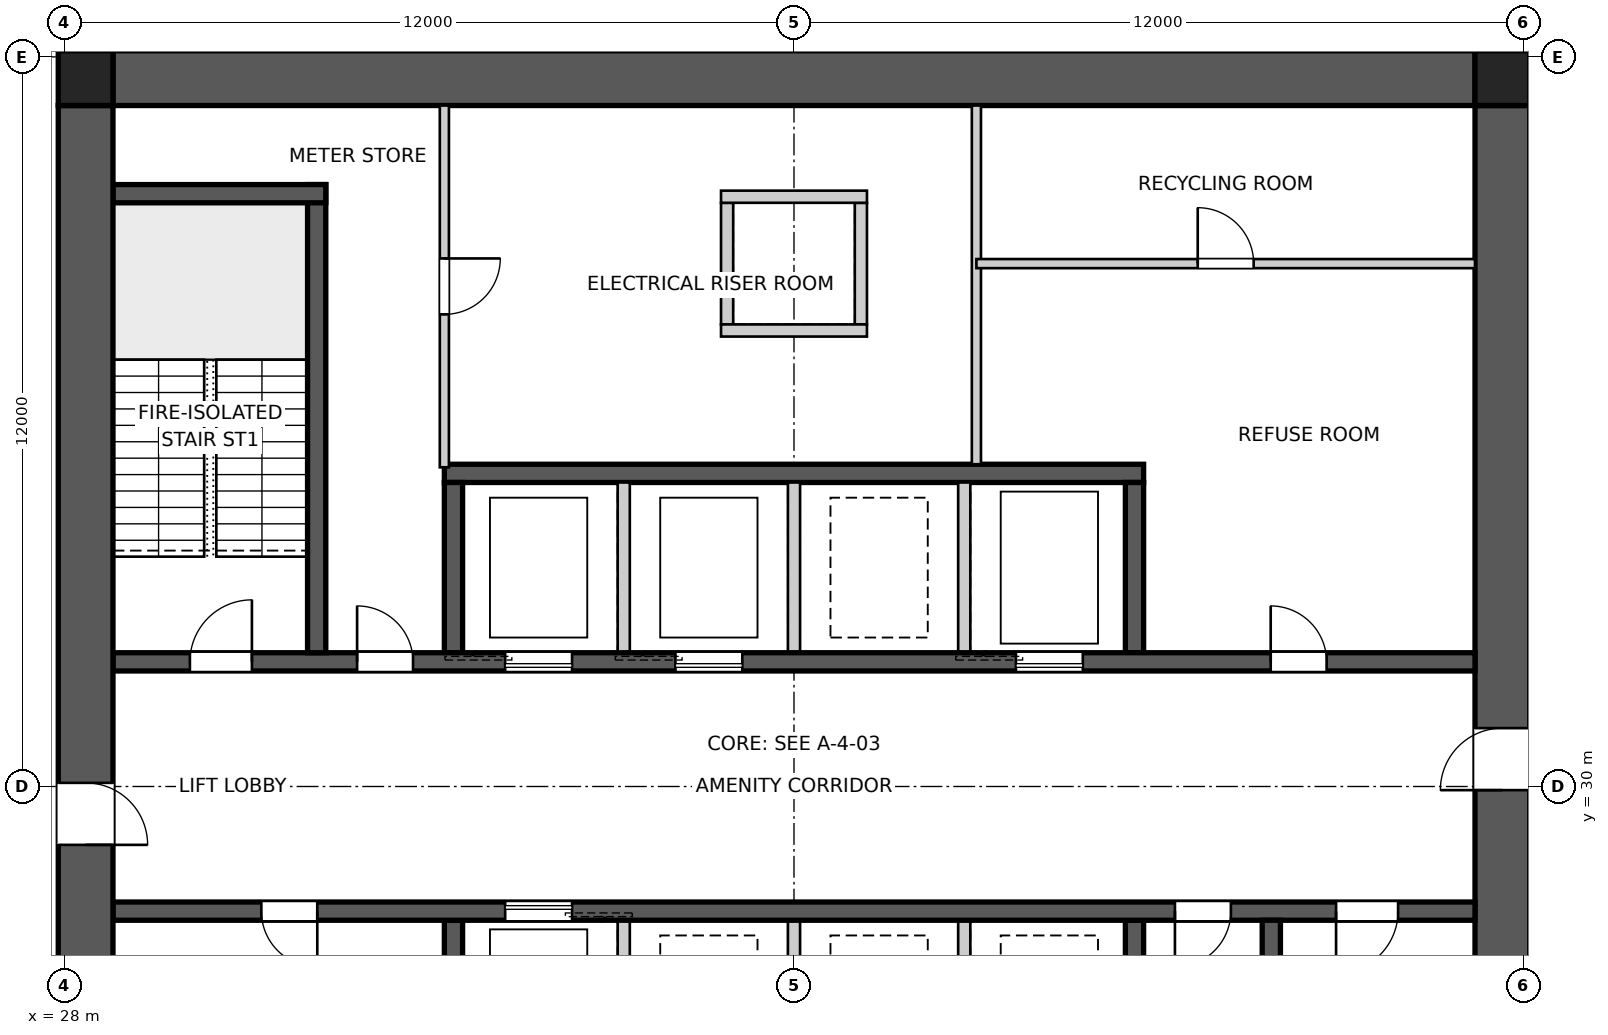
"""IFC4 building model, lengths in metres.
Left out: names, types, materials, properties, quantities, classifications, styles, units other than length and angle.
Written with IfcOpenShell. Run it as: python <this file> out.ifc"""

import sys

from ifc_helpers import new_model, si_unit, direction, frame, frame_2d, origin, origin_2d, place, context, subcontext, project, spatial, polyline, rectangle, outline, extrude, element, fill, save


model = new_model("IFC4")
c1 = context("Model", 3, precision=1e-05, world=origin(), true_north=direction((0.0, 1.0)))
c2 = subcontext(c1, "Body", "Model", "MODEL_VIEW")
j1 = project(units=[si_unit("LENGTHUNIT", "METRE"), si_unit("PLANEANGLEUNIT", "RADIAN")], contexts=[c1])
p1 = place(None, origin())
s1 = spatial("IfcSite", under=j1, at=p1, CompositionType="ELEMENT")
p2 = place(p1, origin())
s2 = spatial("IfcBuilding", under=s1, at=p2, CompositionType="ELEMENT")
p3 = place(p2, frame((0.0, 0.0, 6.0)))
s3 = spatial("IfcBuildingStorey", under=s2, at=p3, CompositionType="ELEMENT", Elevation=6.0)
p4 = place(p3, frame((28.8, 41.65, 0.0), z_axis=(0.0, 0.0, 1.0), x_axis=(1.0, 0.0, 0.0)))
e1 = element("IfcWall", 1, at=p4, inside=s3, PredefinedType="SHEAR", context=c2, shape_type="SweptSolid", body=[
    extrude(outline(polyline([(0.0, -0.45), (22.4, -0.45), (22.4, -0.025), (22.85, -0.025), (22.85, 0.025), (22.4, 0.025), (22.4, 0.45), (0.0, 0.45), (0.0, 0.025), (-0.45, 0.025), (-0.45, -0.025), (0.0, -0.025), (0.0, -0.45)])), origin(), (0.0, 0.0, 1.0), 4.5),
])
p5 = place(p3, frame((51.65, 18.8, 0.0), z_axis=(0.0, 0.0, 1.0), x_axis=(0.0, 1.0, 0.0)))
e2 = element("IfcWall", 2, at=p5, inside=s3, PredefinedType="SHEAR", context=c2, shape_type="SweptSolid", body=[
    extrude(outline(polyline([(0.0, -0.45), (22.4, -0.45), (22.4, -0.025), (22.85, -0.025), (22.85, 0.025), (22.4, 0.025), (22.4, 0.45), (0.0, 0.45), (0.0, 0.025), (-0.45, 0.025), (-0.45, -0.025), (0.0, -0.025), (0.0, -0.45)])), origin(), (0.0, 0.0, 1.0), 4.5),
])
p6 = place(p5, frame((11.14, 0.0, 0.0)))
e3 = element("IfcOpeningElement", 3, at=p6, cuts=e2, PredefinedType="OPENING", context=c2, shape_type="SweptSolid", body=[
    extrude(rectangle(XDim=1.02, YDim=2.4, at=frame_2d((0.51, 1.2))), frame((0.0, 0.46, 0.0), z_axis=(0.0, -1.0, 0.0), x_axis=(1.0, 0.0, 0.0)), (0.0, 0.0, 1.0), 0.92),
])
p7 = place(p3, frame((28.35, 41.2, 0.0), z_axis=(0.0, 0.0, 1.0), x_axis=(0.0, -1.0, 0.0)))
e4 = element("IfcWall", 4, at=p7, inside=s3, PredefinedType="SHEAR", context=c2, shape_type="SweptSolid", body=[
    extrude(outline(polyline([(0.0, -0.45), (22.4, -0.45), (22.4, -0.025), (22.85, -0.025), (22.85, 0.025), (22.4, 0.025), (22.4, 0.45), (0.0, 0.45), (0.0, 0.025), (-0.45, 0.025), (-0.45, -0.025), (0.0, -0.025), (0.0, -0.45)])), origin(), (0.0, 0.0, 1.0), 4.5),
])
p8 = place(p7, frame((11.14, 0.0, 0.0)))
e5 = element("IfcOpeningElement", 5, at=p8, cuts=e4, PredefinedType="OPENING", context=c2, shape_type="SweptSolid", body=[
    extrude(rectangle(XDim=1.02, YDim=2.4, at=frame_2d((0.51, 1.2))), frame((0.0, 0.46, 0.0), z_axis=(0.0, -1.0, 0.0), x_axis=(1.0, 0.0, 0.0)), (0.0, 0.0, 1.0), 0.92),
])
p9 = place(p3, frame((28.8, 32.05, 0.0), z_axis=(0.0, 0.0, 1.0), x_axis=(1.0, 0.0, 0.0)))
e6 = element("IfcWall", 6, at=p9, inside=s3, PredefinedType="SHEAR", context=c2, shape_type="SweptSolid", body=[
    extrude(rectangle(XDim=22.4, YDim=0.3, at=frame_2d((11.2, 0.0))), origin(), (0.0, 0.0, 1.0), 4.5),
])
p10 = place(p9, frame((19.04, 0.0, 0.0)))
e7 = element("IfcOpeningElement", 7, at=p10, cuts=e6, PredefinedType="OPENING", context=c2, shape_type="SweptSolid", body=[
    extrude(rectangle(XDim=0.92, YDim=2.1, at=frame_2d((0.46, 1.05))), frame((0.0, 0.16, 0.0), z_axis=(0.0, -1.0, 0.0), x_axis=(1.0, 0.0, 0.0)), (0.0, 0.0, 1.0), 0.32),
])
p11 = place(p9, frame((1.265, 0.0, 0.0)))
e8 = element("IfcOpeningElement", 8, at=p11, cuts=e6, PredefinedType="OPENING", context=c2, shape_type="SweptSolid", body=[
    extrude(rectangle(XDim=1.02, YDim=2.1, at=frame_2d((0.51, 1.05))), frame((0.0, 0.16, 0.0), z_axis=(0.0, -1.0, 0.0), x_axis=(1.0, 0.0, 0.0)), (0.0, 0.0, 1.0), 0.32),
])
p12 = place(p9, frame((4.015, 0.0, 0.0)))
e9 = element("IfcOpeningElement", 9, at=p12, cuts=e6, PredefinedType="OPENING", context=c2, shape_type="SweptSolid", body=[
    extrude(rectangle(XDim=0.92, YDim=2.1, at=frame_2d((0.46, 1.05))), frame((0.0, 0.16, 0.0), z_axis=(0.0, -1.0, 0.0), x_axis=(1.0, 0.0, 0.0)), (0.0, 0.0, 1.0), 0.32),
])
p13 = place(p9, frame((6.45, 0.0, 0.0)))
e10 = element("IfcOpeningElement", 10, at=p13, cuts=e6, PredefinedType="OPENING", context=c2, shape_type="SweptSolid", body=[
    extrude(rectangle(XDim=1.1, YDim=2.1, at=frame_2d((0.55, 1.05))), frame((0.0, 0.16, 0.0), z_axis=(0.0, -1.0, 0.0), x_axis=(1.0, 0.0, 0.0)), (0.0, 0.0, 1.0), 0.32),
])
p14 = place(p9, frame((9.25, 0.0, 0.0)))
e11 = element("IfcOpeningElement", 11, at=p14, cuts=e6, PredefinedType="OPENING", context=c2, shape_type="SweptSolid", body=[
    extrude(rectangle(XDim=1.1, YDim=2.1, at=frame_2d((0.55, 1.05))), frame((0.0, 0.16, 0.0), z_axis=(0.0, -1.0, 0.0), x_axis=(1.0, 0.0, 0.0)), (0.0, 0.0, 1.0), 0.32),
])
p15 = place(p9, frame((14.85, 0.0, 0.0)))
e12 = element("IfcOpeningElement", 12, at=p15, cuts=e6, PredefinedType="OPENING", context=c2, shape_type="SweptSolid", body=[
    extrude(rectangle(XDim=1.1, YDim=2.1, at=frame_2d((0.55, 1.05))), frame((0.0, 0.16, 0.0), z_axis=(0.0, -1.0, 0.0), x_axis=(1.0, 0.0, 0.0)), (0.0, 0.0, 1.0), 0.32),
])
p16 = place(p3, frame((51.2, 27.95, 0.0), z_axis=(0.0, 0.0, 1.0), x_axis=(-1.0, 0.0, 0.0)))
e13 = element("IfcWall", 13, at=p16, inside=s3, PredefinedType="SHEAR", context=c2, shape_type="SweptSolid", body=[
    extrude(rectangle(XDim=22.4, YDim=0.3, at=frame_2d((11.2, 0.0))), origin(), (0.0, 0.0, 1.0), 4.5),
])
p17 = place(p16, frame((19.04, 0.0, 0.0)))
e14 = element("IfcOpeningElement", 14, at=p17, cuts=e13, PredefinedType="OPENING", context=c2, shape_type="SweptSolid", body=[
    extrude(rectangle(XDim=0.92, YDim=2.1, at=frame_2d((0.46, 1.05))), frame((0.0, 0.16, 0.0), z_axis=(0.0, -1.0, 0.0), x_axis=(1.0, 0.0, 0.0)), (0.0, 0.0, 1.0), 0.32),
])
p18 = place(p16, frame((1.265, 0.0, 0.0)))
e15 = element("IfcOpeningElement", 15, at=p18, cuts=e13, PredefinedType="OPENING", context=c2, shape_type="SweptSolid", body=[
    extrude(rectangle(XDim=1.02, YDim=2.1, at=frame_2d((0.51, 1.05))), frame((0.0, 0.16, 0.0), z_axis=(0.0, -1.0, 0.0), x_axis=(1.0, 0.0, 0.0)), (0.0, 0.0, 1.0), 0.32),
])
p19 = place(p16, frame((4.015, 0.0, 0.0)))
e16 = element("IfcOpeningElement", 16, at=p19, cuts=e13, PredefinedType="OPENING", context=c2, shape_type="SweptSolid", body=[
    extrude(rectangle(XDim=0.92, YDim=2.1, at=frame_2d((0.46, 1.05))), frame((0.0, 0.16, 0.0), z_axis=(0.0, -1.0, 0.0), x_axis=(1.0, 0.0, 0.0)), (0.0, 0.0, 1.0), 0.32),
])
p20 = place(p16, frame((14.85, 0.0, 0.0)))
e17 = element("IfcOpeningElement", 17, at=p20, cuts=e13, PredefinedType="OPENING", context=c2, shape_type="SweptSolid", body=[
    extrude(rectangle(XDim=1.1, YDim=2.1, at=frame_2d((0.55, 1.05))), frame((0.0, 0.16, 0.0), z_axis=(0.0, -1.0, 0.0), x_axis=(1.0, 0.0, 0.0)), (0.0, 0.0, 1.0), 0.32),
])
p21 = place(p3, frame((34.25, 35.15, 0.0), z_axis=(0.0, 0.0, 1.0), x_axis=(1.0, 0.0, 0.0)))
e18 = element("IfcWall", 18, at=p21, inside=s3, PredefinedType="SHEAR", context=c2, shape_type="SweptSolid", body=[
    extrude(rectangle(XDim=11.5, YDim=0.3, at=frame_2d((5.75, 0.0))), origin(), (0.0, 0.0, 1.0), 4.5),
])
for number, where, z_axis, x_axis in (
    (19, (34.4, 32.2, 0.0), (0.0, 0.0, 1.0), (0.0, 1.0, 0.0)),
    (20, (45.6, 27.8, 0.0), (0.0, 0.0, 1.0), (0.0, -1.0, 0.0)),
):
    element("IfcWall", number, at=place(p3, frame(where, z_axis=z_axis, x_axis=x_axis)), inside=s3, PredefinedType="SHEAR", context=c2, shape_type="SweptSolid", body=[
        extrude(rectangle(XDim=2.8, YDim=0.3, at=frame_2d((1.4, 0.0))), origin(), (0.0, 0.0, 1.0), 4.5),
    ])
for number, where, z_axis, x_axis in (
    (21, (37.2, 32.2, 0.0), (0.0, 0.0, 1.0), (0.0, 1.0, 0.0)),
    (22, (42.8, 27.8, 0.0), (0.0, 0.0, 1.0), (0.0, -1.0, 0.0)),
    (23, (40.0, 32.2, 0.0), (0.0, 0.0, 1.0), (0.0, 1.0, 0.0)),
    (24, (40.0, 27.8, 0.0), (0.0, 0.0, 1.0), (0.0, -1.0, 0.0)),
    (25, (42.8, 32.2, 0.0), (0.0, 0.0, 1.0), (0.0, 1.0, 0.0)),
    (26, (37.2, 27.8, 0.0), (0.0, 0.0, 1.0), (0.0, -1.0, 0.0)),
):
    element("IfcWall", number, at=place(p3, frame(where, z_axis=z_axis, x_axis=x_axis)), inside=s3, PredefinedType="SOLIDWALL", context=c2, shape_type="SweptSolid", body=[
        extrude(rectangle(XDim=2.8, YDim=0.2, at=frame_2d((1.4, 0.0))), origin(), (0.0, 0.0, 1.0), 4.5),
    ])
for number, where, z_axis, x_axis in (
    (27, (45.6, 32.2, 0.0), (0.0, 0.0, 1.0), (0.0, 1.0, 0.0)),
    (28, (34.4, 27.8, 0.0), (0.0, 0.0, 1.0), (0.0, -1.0, 0.0)),
):
    element("IfcWall", number, at=place(p3, frame(where, z_axis=z_axis, x_axis=x_axis)), inside=s3, PredefinedType="SHEAR", context=c2, shape_type="SweptSolid", body=[
        extrude(rectangle(XDim=2.8, YDim=0.3, at=frame_2d((1.4, 0.0))), origin(), (0.0, 0.0, 1.0), 4.5),
    ])
p22 = place(p3, frame((32.15, 32.2, 0.0), z_axis=(0.0, 0.0, 1.0), x_axis=(0.0, 1.0, 0.0)))
e29 = element("IfcWall", 29, at=p22, inside=s3, PredefinedType="SHEAR", context=c2, shape_type="SweptSolid", body=[
    extrude(rectangle(XDim=7.7, YDim=0.3, at=frame_2d((3.85, 0.0))), origin(), (0.0, 0.0, 1.0), 4.5),
])
p23 = place(p3, frame((28.8, 39.75, 0.0), z_axis=(0.0, 0.0, 1.0), x_axis=(1.0, 0.0, 0.0)))
e30 = element("IfcWall", 30, at=p23, inside=s3, PredefinedType="SHEAR", context=c2, shape_type="SweptSolid", body=[
    extrude(rectangle(XDim=3.5, YDim=0.3, at=frame_2d((1.75, 0.0))), origin(), (0.0, 0.0, 1.0), 4.5),
])
p24 = place(p3, frame((47.85, 27.8, 0.0), z_axis=(0.0, 0.0, 1.0), x_axis=(0.0, -1.0, 0.0)))
e31 = element("IfcWall", 31, at=p24, inside=s3, PredefinedType="SHEAR", context=c2, shape_type="SweptSolid", body=[
    extrude(rectangle(XDim=7.7, YDim=0.3, at=frame_2d((3.85, 0.0))), origin(), (0.0, 0.0, 1.0), 4.5),
])
for number, where, z_axis, x_axis in (
    (32, (38.9, 37.6, 0.0), (0.0, 0.0, 1.0), (0.0, 1.0, 0.0)),
    (33, (41.1, 37.6, 0.0), (0.0, 0.0, 1.0), (0.0, 1.0, 0.0)),
):
    element("IfcWall", number, at=place(p3, frame(where, z_axis=z_axis, x_axis=x_axis)), inside=s3, PredefinedType="SOLIDWALL", context=c2, shape_type="SweptSolid", body=[
        extrude(rectangle(XDim=2.0, YDim=0.2, at=frame_2d((1.0, 0.0))), origin(), (0.0, 0.0, 1.0), 4.5),
    ])
for number, where, z_axis, x_axis in (
    (34, (38.8, 37.5, 0.0), (0.0, 0.0, 1.0), (1.0, 0.0, 0.0)),
    (35, (38.8, 39.7, 0.0), (0.0, 0.0, 1.0), (1.0, 0.0, 0.0)),
):
    element("IfcWall", number, at=place(p3, frame(where, z_axis=z_axis, x_axis=x_axis)), inside=s3, PredefinedType="SOLIDWALL", context=c2, shape_type="SweptSolid", body=[
        extrude(rectangle(XDim=2.4, YDim=0.2, at=frame_2d((1.2, 0.0))), origin(), (0.0, 0.0, 1.0), 4.5),
    ])
for number, where, z_axis, x_axis in (
    (36, (51.65, 41.65, 0.0), (0.0, 0.0, 1.0), (1.0, 0.0, 0.0)),
    (37, (28.35, 41.65, 0.0), (0.0, 0.0, 1.0), (1.0, 0.0, 0.0)),
):
    element("IfcColumn", number, at=place(p3, frame(where, z_axis=z_axis, x_axis=x_axis)), inside=s3, PredefinedType="COLUMN", context=c2, shape_type="SweptSolid", body=[
        extrude(rectangle(XDim=0.9, YDim=0.9, at=origin_2d()), origin(), (0.0, 0.0, 1.0), 4.5),
    ])
p25 = place(p3, frame((34.25, 41.2, 0.0), z_axis=(0.0, 0.0, 1.0), x_axis=(0.0, -1.0, 0.0)))
e38 = element("IfcWall", 38, at=p25, inside=s3, PredefinedType="SOLIDWALL", context=c2, shape_type="SweptSolid", body=[
    extrude(rectangle(XDim=5.95, YDim=0.15, at=frame_2d((2.975, 0.0))), origin(), (0.0, 0.0, 1.0), 4.15),
])
p26 = place(p25, frame((2.515, 0.0, 0.0)))
e39 = element("IfcOpeningElement", 39, at=p26, cuts=e38, PredefinedType="OPENING", context=c2, shape_type="SweptSolid", body=[
    extrude(rectangle(XDim=0.92, YDim=2.1, at=frame_2d((0.46, 1.05))), frame((0.0, 0.085, 0.0), z_axis=(0.0, -1.0, 0.0), x_axis=(1.0, 0.0, 0.0)), (0.0, 0.0, 1.0), 0.17),
])
p27 = place(p3, frame((43.0, 41.2, 0.0), z_axis=(0.0, 0.0, 1.0), x_axis=(0.0, -1.0, 0.0)))
e40 = element("IfcWall", 40, at=p27, inside=s3, PredefinedType="SOLIDWALL", context=c2, shape_type="SweptSolid", body=[
    extrude(rectangle(XDim=5.9, YDim=0.15, at=frame_2d((2.95, 0.0))), origin(), (0.0, 0.0, 1.0), 4.15),
])
p28 = place(p3, frame((43.0, 38.6, 0.0), z_axis=(0.0, 0.0, 1.0), x_axis=(1.0, 0.0, 0.0)))
e41 = element("IfcWall", 41, at=p28, inside=s3, PredefinedType="SOLIDWALL", context=c2, shape_type="SweptSolid", body=[
    extrude(rectangle(XDim=8.2, YDim=0.15, at=frame_2d((4.1, 0.0))), origin(), (0.0, 0.0, 1.0), 4.15),
])
p29 = place(p28, frame((3.64, 0.0, 0.0)))
e42 = element("IfcOpeningElement", 42, at=p29, cuts=e41, PredefinedType="OPENING", context=c2, shape_type="SweptSolid", body=[
    extrude(rectangle(XDim=0.92, YDim=2.1, at=frame_2d((0.46, 1.05))), frame((0.0, 0.085, 0.0), z_axis=(0.0, -1.0, 0.0), x_axis=(1.0, 0.0, 0.0)), (0.0, 0.0, 1.0), 0.17),
])
p30 = place(p10, origin())
e43 = element("IfcDoor", 43, at=p30, inside=s3, OperationType="SINGLE_SWING_LEFT", PredefinedType="DOOR", context=c2, shape_type="SweptSolid", body=[
    extrude(rectangle(XDim=0.92, YDim=2.1, at=frame_2d((0.46, 1.05))), frame((0.0, 0.025, 0.0), z_axis=(0.0, -1.0, 0.0), x_axis=(1.0, 0.0, 0.0)), (0.0, 0.0, 1.0), 0.05),
])
fill(e7, e43)
p31 = place(p17, origin())
e44 = element("IfcDoor", 44, at=p31, inside=s3, OperationType="SINGLE_SWING_LEFT", PredefinedType="DOOR", context=c2, shape_type="SweptSolid", body=[
    extrude(rectangle(XDim=0.92, YDim=2.1, at=frame_2d((0.46, 1.05))), frame((0.0, 0.025, 0.0), z_axis=(0.0, -1.0, 0.0), x_axis=(1.0, 0.0, 0.0)), (0.0, 0.0, 1.0), 0.05),
])
fill(e14, e44)
p32 = place(p18, origin())
e45 = element("IfcDoor", 45, at=p32, inside=s3, OperationType="SINGLE_SWING_RIGHT", PredefinedType="DOOR", context=c2, shape_type="SweptSolid", body=[
    extrude(rectangle(XDim=1.02, YDim=2.1, at=frame_2d((0.51, 1.05))), frame((0.0, 0.025, 0.0), z_axis=(0.0, -1.0, 0.0), x_axis=(1.0, 0.0, 0.0)), (0.0, 0.0, 1.0), 0.05),
])
fill(e15, e45)
p33 = place(p11, origin())
e46 = element("IfcDoor", 46, at=p33, inside=s3, OperationType="SINGLE_SWING_RIGHT", PredefinedType="DOOR", context=c2, shape_type="SweptSolid", body=[
    extrude(rectangle(XDim=1.02, YDim=2.1, at=frame_2d((0.51, 1.05))), frame((0.0, 0.025, 0.0), z_axis=(0.0, -1.0, 0.0), x_axis=(1.0, 0.0, 0.0)), (0.0, 0.0, 1.0), 0.05),
])
fill(e8, e46)
p34 = place(p12, origin())
e47 = element("IfcDoor", 47, at=p34, inside=s3, OperationType="SINGLE_SWING_LEFT", PredefinedType="DOOR", context=c2, shape_type="SweptSolid", body=[
    extrude(rectangle(XDim=0.92, YDim=2.1, at=frame_2d((0.46, 1.05))), frame((0.0, 0.025, 0.0), z_axis=(0.0, -1.0, 0.0), x_axis=(1.0, 0.0, 0.0)), (0.0, 0.0, 1.0), 0.05),
])
fill(e9, e47)
p35 = place(p19, origin())
e48 = element("IfcDoor", 48, at=p35, inside=s3, OperationType="SINGLE_SWING_RIGHT", PredefinedType="DOOR", context=c2, shape_type="SweptSolid", body=[
    extrude(rectangle(XDim=0.92, YDim=2.1, at=frame_2d((0.46, 1.05))), frame((0.0, 0.025, 0.0), z_axis=(0.0, -1.0, 0.0), x_axis=(1.0, 0.0, 0.0)), (0.0, 0.0, 1.0), 0.05),
])
fill(e16, e48)
p36 = place(p29, origin())
e49 = element("IfcDoor", 49, at=p36, inside=s3, OperationType="SINGLE_SWING_LEFT", PredefinedType="DOOR", context=c2, shape_type="SweptSolid", body=[
    extrude(rectangle(XDim=0.92, YDim=2.1, at=frame_2d((0.46, 1.05))), frame((0.0, 0.025, 0.0), z_axis=(0.0, -1.0, 0.0), x_axis=(1.0, 0.0, 0.0)), (0.0, 0.0, 1.0), 0.05),
])
fill(e42, e49)
p37 = place(p26, origin())
e50 = element("IfcDoor", 50, at=p37, inside=s3, OperationType="SINGLE_SWING_LEFT", PredefinedType="DOOR", context=c2, shape_type="SweptSolid", body=[
    extrude(rectangle(XDim=0.92, YDim=2.1, at=frame_2d((0.46, 1.05))), frame((0.0, 0.025, 0.0), z_axis=(0.0, -1.0, 0.0), x_axis=(1.0, 0.0, 0.0)), (0.0, 0.0, 1.0), 0.05),
])
fill(e39, e50)
p38 = place(p6, origin())
e51 = element("IfcDoor", 51, at=p38, inside=s3, OperationType="SINGLE_SWING_LEFT", PredefinedType="DOOR", context=c2, shape_type="SweptSolid", body=[
    extrude(rectangle(XDim=1.02, YDim=2.4, at=frame_2d((0.51, 1.2))), frame((0.0, 0.025, 0.0), z_axis=(0.0, -1.0, 0.0), x_axis=(1.0, 0.0, 0.0)), (0.0, 0.0, 1.0), 0.05),
])
fill(e3, e51)
p39 = place(p8, origin())
e52 = element("IfcDoor", 52, at=p39, inside=s3, OperationType="SINGLE_SWING_RIGHT", PredefinedType="DOOR", context=c2, shape_type="SweptSolid", body=[
    extrude(rectangle(XDim=1.02, YDim=2.4, at=frame_2d((0.51, 1.2))), frame((0.0, 0.025, 0.0), z_axis=(0.0, -1.0, 0.0), x_axis=(1.0, 0.0, 0.0)), (0.0, 0.0, 1.0), 0.05),
])
fill(e5, e52)
p40 = place(p13, origin())
e53 = element("IfcDoor", 53, at=p40, inside=s3, OperationType="SLIDING_TO_LEFT", PredefinedType="DOOR", context=c2, shape_type="SweptSolid", body=[
    extrude(rectangle(XDim=1.1, YDim=2.1, at=frame_2d((0.55, 1.05))), frame((0.0, 0.025, 0.0), z_axis=(0.0, -1.0, 0.0), x_axis=(1.0, 0.0, 0.0)), (0.0, 0.0, 1.0), 0.05),
])
fill(e10, e53)
p41 = place(p14, origin())
e54 = element("IfcDoor", 54, at=p41, inside=s3, OperationType="SLIDING_TO_LEFT", PredefinedType="DOOR", context=c2, shape_type="SweptSolid", body=[
    extrude(rectangle(XDim=1.1, YDim=2.1, at=frame_2d((0.55, 1.05))), frame((0.0, 0.025, 0.0), z_axis=(0.0, -1.0, 0.0), x_axis=(1.0, 0.0, 0.0)), (0.0, 0.0, 1.0), 0.05),
])
fill(e11, e54)
p42 = place(p15, origin())
e55 = element("IfcDoor", 55, at=p42, inside=s3, OperationType="SLIDING_TO_LEFT", PredefinedType="DOOR", context=c2, shape_type="SweptSolid", body=[
    extrude(rectangle(XDim=1.1, YDim=2.1, at=frame_2d((0.55, 1.05))), frame((0.0, 0.025, 0.0), z_axis=(0.0, -1.0, 0.0), x_axis=(1.0, 0.0, 0.0)), (0.0, 0.0, 1.0), 0.05),
])
fill(e12, e55)
p43 = place(p20, origin())
e56 = element("IfcDoor", 56, at=p43, inside=s3, OperationType="SLIDING_TO_LEFT", PredefinedType="DOOR", context=c2, shape_type="SweptSolid", body=[
    extrude(rectangle(XDim=1.1, YDim=2.1, at=frame_2d((0.55, 1.05))), frame((0.0, 0.025, 0.0), z_axis=(0.0, -1.0, 0.0), x_axis=(1.0, 0.0, 0.0)), (0.0, 0.0, 1.0), 0.05),
])
fill(e17, e56)
save(model, sys.argv[1])
